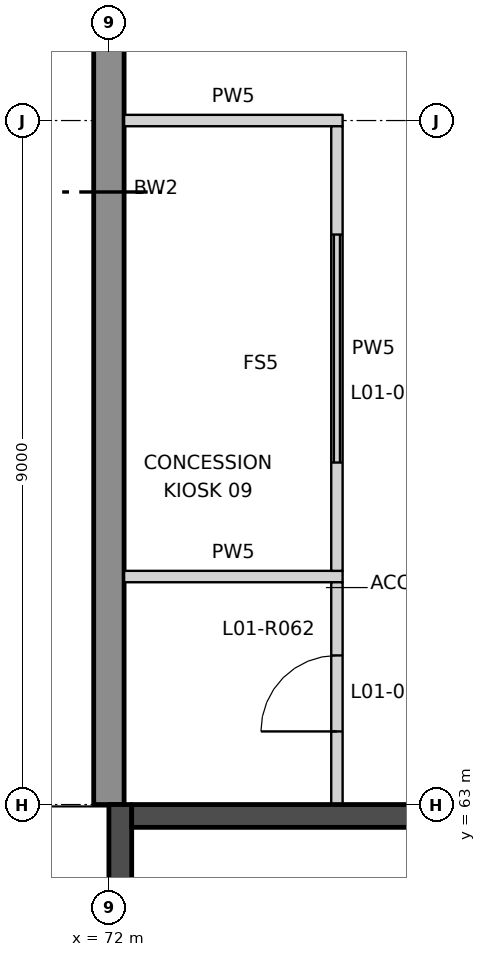
"""IFC4 building model, lengths in metres.
Left out: names, types, materials, properties, quantities, classifications, styles, units other than length and angle.
Written with IfcOpenShell. Run it as: python <this file> out.ifc"""

import sys

from ifc_helpers import new_model, si_unit, direction, frame, frame_2d, origin, place, context, subcontext, project, spatial, rectangle, extrude, element, fill, save


model = new_model("IFC4")
c1 = context("Model", 3, precision=1e-05, world=origin(), true_north=direction((0.0, 1.0)))
c2 = subcontext(c1, "Body", "Model", "MODEL_VIEW")
j1 = project(units=[si_unit("LENGTHUNIT", "METRE"), si_unit("PLANEANGLEUNIT", "RADIAN")], contexts=[c1])
p1 = place(None, origin())
s1 = spatial("IfcSite", under=j1, at=p1, CompositionType="ELEMENT")
p2 = place(p1, origin())
s2 = spatial("IfcBuilding", under=s1, at=p2, CompositionType="ELEMENT")
p3 = place(p2, frame((0.0, 0.0, 7.0)))
s3 = spatial("IfcBuildingStorey", under=s2, at=p3, CompositionType="ELEMENT", Elevation=7.0)
p4 = place(p3, frame((72.0, 79.2, 0.0), z_axis=(0.0, 0.0, 1.0), x_axis=(0.0, -1.0, 0.0)))
e1 = element("IfcWall", 1, at=p4, inside=s3, PredefinedType="SOLIDWALL", context=c2, shape_type="SweptSolid", body=[
    extrude(rectangle(XDim=16.2, YDim=0.4, at=frame_2d((8.1, 0.0))), origin(), (0.0, 0.0, 1.0), 4.5),
])
p5 = place(p3, frame((72.2, 66.0, 0.0), z_axis=(0.0, 0.0, 1.0), x_axis=(1.0, 0.0, 0.0)))
e2 = element("IfcWall", 2, at=p5, inside=s3, PredefinedType="PARTITIONING", context=c2, shape_type="SweptSolid", body=[
    extrude(rectangle(XDim=2.875, YDim=0.15, at=frame_2d((1.438, 0.0))), origin(), (0.0, 0.0, 1.0), 4.5),
])
p6 = place(p3, frame((72.2, 72.0, 0.0), z_axis=(0.0, 0.0, 1.0), x_axis=(1.0, 0.0, 0.0)))
e3 = element("IfcWall", 3, at=p6, inside=s3, PredefinedType="PARTITIONING", context=c2, shape_type="SweptSolid", body=[
    extrude(rectangle(XDim=2.875, YDim=0.15, at=frame_2d((1.438, 0.0))), origin(), (0.0, 0.0, 1.0), 3.25),
])
p7 = place(p3, frame((75.0, 63.0, 0.0), z_axis=(0.0, 0.0, 1.0), x_axis=(0.0, 1.0, 0.0)))
e4 = element("IfcWall", 4, at=p7, inside=s3, PredefinedType="PARTITIONING", context=c2, shape_type="SweptSolid", body=[
    extrude(rectangle(XDim=2.925, YDim=0.15, at=frame_2d((1.462, 0.0))), origin(), (0.0, 0.0, 1.0), 4.5),
])
p8 = place(p7, frame((0.962, 0.0, 0.0)))
e5 = element("IfcOpeningElement", 5, at=p8, cuts=e4, PredefinedType="OPENING", context=c2, shape_type="SweptSolid", body=[
    extrude(rectangle(XDim=1.0, YDim=2.1, at=frame_2d((0.5, 1.05))), frame((0.0, 0.085, 0.0), z_axis=(0.0, -1.0, 0.0), x_axis=(1.0, 0.0, 0.0)), (0.0, 0.0, 1.0), 0.17),
])
p9 = place(p3, frame((75.0, 66.075, 0.0), z_axis=(0.0, 0.0, 1.0), x_axis=(0.0, 1.0, 0.0)))
e6 = element("IfcWall", 6, at=p9, inside=s3, PredefinedType="PARTITIONING", context=c2, shape_type="SweptSolid", body=[
    extrude(rectangle(XDim=5.85, YDim=0.15, at=frame_2d((2.925, 0.0))), origin(), (0.0, 0.0, 1.0), 4.5),
])
p10 = place(p9, frame((1.425, 0.0, 0.0)))
e7 = element("IfcOpeningElement", 7, at=p10, cuts=e6, PredefinedType="OPENING", context=c2, shape_type="SweptSolid", body=[
    extrude(rectangle(XDim=3.0, YDim=2.4, at=frame_2d((1.5, 1.2))), frame((0.0, 0.085, 0.0), z_axis=(0.0, -1.0, 0.0), x_axis=(1.0, 0.0, 0.0)), (0.0, 0.0, 1.0), 0.17),
])
p11 = place(p3, frame((72.15, 63.0, 0.0), z_axis=(0.0, 0.0, 1.0), x_axis=(0.0, -1.0, 0.0)))
e8 = element("IfcWall", 8, at=p11, inside=s3, PredefinedType="SHEAR", context=c2, shape_type="SweptSolid", body=[
    extrude(rectangle(XDim=18.0, YDim=0.3, at=frame_2d((9.0, 0.0))), origin(), (0.0, 0.0, 1.0), 4.5),
])
p12 = place(p3, frame((80.7, 62.85, 0.0), z_axis=(0.0, 0.0, 1.0), x_axis=(-1.0, 0.0, 0.0)))
e9 = element("IfcWall", 9, at=p12, inside=s3, PredefinedType="SHEAR", context=c2, shape_type="SweptSolid", body=[
    extrude(rectangle(XDim=8.4, YDim=0.3, at=frame_2d((4.2, 0.0))), origin(), (0.0, 0.0, 1.0), 4.5),
])
p13 = place(p8, origin())
e10 = element("IfcDoor", 10, at=p13, inside=s3, OperationType="SINGLE_SWING_LEFT", PredefinedType="DOOR", context=c2, shape_type="SweptSolid", body=[
    extrude(rectangle(XDim=1.0, YDim=2.1, at=frame_2d((0.5, 1.05))), frame((0.0, 0.025, 0.0), z_axis=(0.0, -1.0, 0.0), x_axis=(1.0, 0.0, 0.0)), (0.0, 0.0, 1.0), 0.05),
])
fill(e5, e10)
p14 = place(p10, origin())
e11 = element("IfcDoor", 11, at=p14, inside=s3, OperationType="ROLLINGUP", PredefinedType="DOOR", context=c2, shape_type="SweptSolid", body=[
    extrude(rectangle(XDim=3.0, YDim=2.4, at=frame_2d((1.5, 1.2))), frame((0.0, 0.025, 0.0), z_axis=(0.0, -1.0, 0.0), x_axis=(1.0, 0.0, 0.0)), (0.0, 0.0, 1.0), 0.05),
])
fill(e7, e11)
save(model, sys.argv[1])
